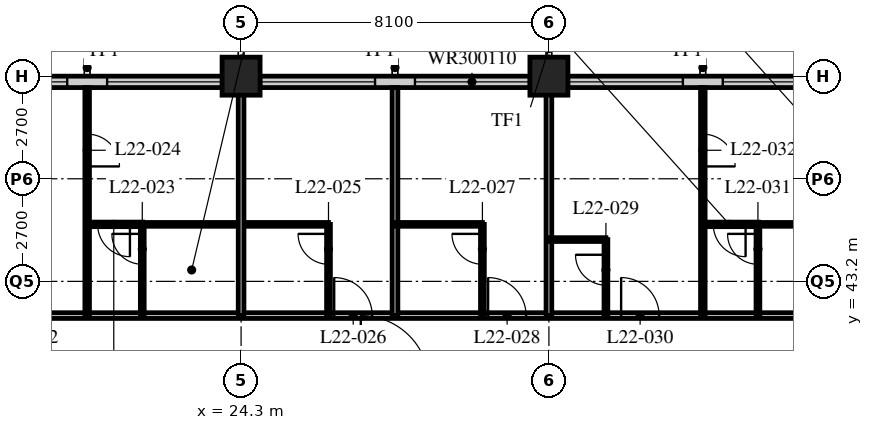
"""IFC4 building model, lengths in metres.
Left out: names, types, materials, properties, quantities, classifications, styles, units other than length and angle.
Written with IfcOpenShell. Run it as: python <this file> out.ifc"""

import sys

from ifc_helpers import new_model, si_unit, direction, frame, frame_2d, origin, origin_2d, place, context, subcontext, project, spatial, rectangle, hollow_rectangle, extrude, element, fill, save


model = new_model("IFC4")
c1 = context("Model", 3, precision=1e-05, world=origin(), true_north=direction((0.0, 1.0)))
c2 = subcontext(c1, "Body", "Model", "MODEL_VIEW")
j1 = project(units=[si_unit("LENGTHUNIT", "METRE"), si_unit("PLANEANGLEUNIT", "RADIAN")], contexts=[c1])
p1 = place(None, origin())
s1 = spatial("IfcSite", under=j1, at=p1, CompositionType="ELEMENT")
p2 = place(p1, origin())
s2 = spatial("IfcBuilding", under=s1, at=p2, CompositionType="ELEMENT")
p3 = place(p2, frame((0.0, 0.0, 87.4)))
s3 = spatial("IfcBuildingStorey", under=s2, at=p3, CompositionType="ELEMENT", Elevation=87.4)
for number, where, z_axis, x_axis in (
    (1, (24.3, 48.6, 0.0), (0.0, 0.0, 1.0), (1.0, 0.0, 0.0)),
    (2, (32.4, 48.6, 0.0), (0.0, 0.0, 1.0), (1.0, 0.0, 0.0)),
):
    element("IfcColumn", number, at=place(p3, frame(where, z_axis=z_axis, x_axis=x_axis)), inside=s3, PredefinedType="COLUMN", context=c2, shape_type="SweptSolid", body=[
        extrude(hollow_rectangle(XDim=1.0, YDim=1.0, WallThickness=0.1, at=origin_2d()), origin(), (0.0, 0.0, 1.0), 3.4),
    ])
p4 = place(p3, frame((48.3, 48.45, 0.0), z_axis=(0.0, 0.0, 1.0), x_axis=(-1.0, 0.0, 0.0)))
e3 = element("IfcWall", 3, at=p4, inside=s3, PredefinedType="SOLIDWALL", context=c2, shape_type="SweptSolid", body=[
    extrude(rectangle(XDim=40.2, YDim=0.3, at=frame_2d((20.1, 0.0))), origin(), (0.0, 0.0, 1.0), 2.05),
])
p5 = place(p4, frame((0.225, 0.0, 0.9)))
e4 = element("IfcOpeningElement", 4, at=p5, cuts=e3, PredefinedType="OPENING", context=c2, shape_type="SweptSolid", body=[
    extrude(rectangle(XDim=3.0, YDim=1.1, at=frame_2d((1.5, 0.55))), frame((0.0, 0.16, 0.0), z_axis=(0.0, -1.0, 0.0), x_axis=(1.0, 0.0, 0.0)), (0.0, 0.0, 1.0), 0.32),
])
p6 = place(p4, frame((4.275, 0.0, 0.9)))
e5 = element("IfcOpeningElement", 5, at=p6, cuts=e3, PredefinedType="OPENING", context=c2, shape_type="SweptSolid", body=[
    extrude(rectangle(XDim=3.0, YDim=1.1, at=frame_2d((1.5, 0.55))), frame((0.0, 0.16, 0.0), z_axis=(0.0, -1.0, 0.0), x_axis=(1.0, 0.0, 0.0)), (0.0, 0.0, 1.0), 0.32),
])
p7 = place(p4, frame((8.325, 0.0, 0.9)))
e6 = element("IfcOpeningElement", 6, at=p7, cuts=e3, PredefinedType="OPENING", context=c2, shape_type="SweptSolid", body=[
    extrude(rectangle(XDim=3.0, YDim=1.1, at=frame_2d((1.5, 0.55))), frame((0.0, 0.16, 0.0), z_axis=(0.0, -1.0, 0.0), x_axis=(1.0, 0.0, 0.0)), (0.0, 0.0, 1.0), 0.32),
])
p8 = place(p4, frame((12.375, 0.0, 0.9)))
e7 = element("IfcOpeningElement", 7, at=p8, cuts=e3, PredefinedType="OPENING", context=c2, shape_type="SweptSolid", body=[
    extrude(rectangle(XDim=3.0, YDim=1.1, at=frame_2d((1.5, 0.55))), frame((0.0, 0.16, 0.0), z_axis=(0.0, -1.0, 0.0), x_axis=(1.0, 0.0, 0.0)), (0.0, 0.0, 1.0), 0.32),
])
p9 = place(p4, frame((16.425, 0.0, 0.9)))
e8 = element("IfcOpeningElement", 8, at=p9, cuts=e3, PredefinedType="OPENING", context=c2, shape_type="SweptSolid", body=[
    extrude(rectangle(XDim=3.0, YDim=1.1, at=frame_2d((1.5, 0.55))), frame((0.0, 0.16, 0.0), z_axis=(0.0, -1.0, 0.0), x_axis=(1.0, 0.0, 0.0)), (0.0, 0.0, 1.0), 0.32),
])
p10 = place(p4, frame((20.475, 0.0, 0.9)))
e9 = element("IfcOpeningElement", 9, at=p10, cuts=e3, PredefinedType="OPENING", context=c2, shape_type="SweptSolid", body=[
    extrude(rectangle(XDim=3.0, YDim=1.1, at=frame_2d((1.5, 0.55))), frame((0.0, 0.16, 0.0), z_axis=(0.0, -1.0, 0.0), x_axis=(1.0, 0.0, 0.0)), (0.0, 0.0, 1.0), 0.32),
])
p11 = place(p4, frame((24.525, 0.0, 0.9)))
e10 = element("IfcOpeningElement", 10, at=p11, cuts=e3, PredefinedType="OPENING", context=c2, shape_type="SweptSolid", body=[
    extrude(rectangle(XDim=3.0, YDim=1.1, at=frame_2d((1.5, 0.55))), frame((0.0, 0.16, 0.0), z_axis=(0.0, -1.0, 0.0), x_axis=(1.0, 0.0, 0.0)), (0.0, 0.0, 1.0), 0.32),
])
p12 = place(p4, frame((28.575, 0.0, 0.9)))
e11 = element("IfcOpeningElement", 11, at=p12, cuts=e3, PredefinedType="OPENING", context=c2, shape_type="SweptSolid", body=[
    extrude(rectangle(XDim=3.0, YDim=1.1, at=frame_2d((1.5, 0.55))), frame((0.0, 0.16, 0.0), z_axis=(0.0, -1.0, 0.0), x_axis=(1.0, 0.0, 0.0)), (0.0, 0.0, 1.0), 0.32),
])
p13 = place(p4, frame((32.625, 0.0, 0.9)))
e12 = element("IfcOpeningElement", 12, at=p13, cuts=e3, PredefinedType="OPENING", context=c2, shape_type="SweptSolid", body=[
    extrude(rectangle(XDim=3.0, YDim=1.1, at=frame_2d((1.5, 0.55))), frame((0.0, 0.16, 0.0), z_axis=(0.0, -1.0, 0.0), x_axis=(1.0, 0.0, 0.0)), (0.0, 0.0, 1.0), 0.32),
])
p14 = place(p4, frame((36.675, 0.0, 0.9)))
e13 = element("IfcOpeningElement", 13, at=p14, cuts=e3, PredefinedType="OPENING", context=c2, shape_type="SweptSolid", body=[
    extrude(rectangle(XDim=3.0, YDim=1.1, at=frame_2d((1.5, 0.55))), frame((0.0, 0.16, 0.0), z_axis=(0.0, -1.0, 0.0), x_axis=(1.0, 0.0, 0.0)), (0.0, 0.0, 1.0), 0.32),
])
p15 = place(p3, frame((12.15, 42.3, 0.0), z_axis=(0.0, 0.0, 1.0), x_axis=(1.0, 0.0, 0.0)))
e14 = element("IfcWall", 14, at=p15, inside=s3, PredefinedType="PARTITIONING", context=c2, shape_type="SweptSolid", body=[
    extrude(rectangle(XDim=32.4, YDim=0.15, at=frame_2d((16.2, 0.0))), origin(), (0.0, 0.0, 1.0), 3.15),
])
p16 = place(p15, frame((5.95, 0.0, 0.0)))
e15 = element("IfcOpeningElement", 15, at=p16, cuts=e14, PredefinedType="OPENING", context=c2, shape_type="SweptSolid", body=[
    extrude(rectangle(XDim=1.0, YDim=2.1, at=frame_2d((0.5, 1.05))), frame((0.0, 0.085, 0.0), z_axis=(0.0, -1.0, 0.0), x_axis=(1.0, 0.0, 0.0)), (0.0, 0.0, 1.0), 0.17),
])
p17 = place(p15, frame((14.6, 0.0, 0.0)))
e16 = element("IfcOpeningElement", 16, at=p17, cuts=e14, PredefinedType="OPENING", context=c2, shape_type="SweptSolid", body=[
    extrude(rectangle(XDim=1.0, YDim=2.1, at=frame_2d((0.5, 1.05))), frame((0.0, 0.085, 0.0), z_axis=(0.0, -1.0, 0.0), x_axis=(1.0, 0.0, 0.0)), (0.0, 0.0, 1.0), 0.17),
])
p18 = place(p15, frame((18.65, 0.0, 0.0)))
e17 = element("IfcOpeningElement", 17, at=p18, cuts=e14, PredefinedType="OPENING", context=c2, shape_type="SweptSolid", body=[
    extrude(rectangle(XDim=1.0, YDim=2.1, at=frame_2d((0.5, 1.05))), frame((0.0, 0.085, 0.0), z_axis=(0.0, -1.0, 0.0), x_axis=(1.0, 0.0, 0.0)), (0.0, 0.0, 1.0), 0.17),
])
p19 = place(p15, frame((22.15, 0.0, 0.0)))
e18 = element("IfcOpeningElement", 18, at=p19, cuts=e14, PredefinedType="OPENING", context=c2, shape_type="SweptSolid", body=[
    extrude(rectangle(XDim=1.0, YDim=2.1, at=frame_2d((0.5, 1.05))), frame((0.0, 0.085, 0.0), z_axis=(0.0, -1.0, 0.0), x_axis=(1.0, 0.0, 0.0)), (0.0, 0.0, 1.0), 0.17),
])
p20 = place(p15, frame((29.025, 0.0, 0.0)))
e19 = element("IfcOpeningElement", 19, at=p20, cuts=e14, PredefinedType="OPENING", context=c2, shape_type="SweptSolid", body=[
    extrude(rectangle(XDim=1.0, YDim=2.1, at=frame_2d((0.5, 1.05))), frame((0.0, 0.085, 0.0), z_axis=(0.0, -1.0, 0.0), x_axis=(1.0, 0.0, 0.0)), (0.0, 0.0, 1.0), 0.17),
])
p21 = place(p15, frame((2.375, 0.0, 0.0)))
e20 = element("IfcOpeningElement", 20, at=p21, cuts=e14, PredefinedType="OPENING", context=c2, shape_type="SweptSolid", body=[
    extrude(rectangle(XDim=1.0, YDim=2.1, at=frame_2d((0.5, 1.05))), frame((0.0, 0.085, 0.0), z_axis=(0.0, -1.0, 0.0), x_axis=(1.0, 0.0, 0.0)), (0.0, 0.0, 1.0), 0.17),
])
p22 = place(p3, frame((21.7, 44.7, 0.0), z_axis=(0.0, 0.0, 1.0), x_axis=(1.0, 0.0, 0.0)))
e21 = element("IfcWall", 21, at=p22, inside=s3, PredefinedType="PARTITIONING", context=c2, shape_type="SweptSolid", body=[
    extrude(rectangle(XDim=4.9, YDim=0.1, at=frame_2d((2.45, 0.0))), origin(), (0.0, 0.0, 1.0), 3.15),
])
p23 = place(p3, frame((21.7, 42.3, 0.0), z_axis=(0.0, 0.0, 1.0), x_axis=(0.0, 1.0, 0.0)))
e22 = element("IfcWall", 22, at=p23, inside=s3, PredefinedType="PARTITIONING", context=c2, shape_type="SweptSolid", body=[
    extrude(rectangle(XDim=2.4, YDim=0.1, at=frame_2d((1.2, 0.0))), origin(), (0.0, 0.0, 1.0), 3.15),
])
p24 = place(p23, frame((1.35, 0.0, 0.0)))
e23 = element("IfcOpeningElement", 23, at=p24, cuts=e22, PredefinedType="OPENING", context=c2, shape_type="SweptSolid", body=[
    extrude(rectangle(XDim=0.8, YDim=2.1, at=frame_2d((0.4, 1.05))), frame((0.0, 0.06, 0.0), z_axis=(0.0, -1.0, 0.0), x_axis=(1.0, 0.0, 0.0)), (0.0, 0.0, 1.0), 0.12),
])
p25 = place(p3, frame((20.25, 42.3, 0.0), z_axis=(0.0, 0.0, 1.0), x_axis=(0.0, 1.0, 0.0)))
e24 = element("IfcWall", 24, at=p25, inside=s3, PredefinedType="PARTITIONING", context=c2, shape_type="SweptSolid", body=[
    extrude(rectangle(XDim=6.0, YDim=0.12, at=frame_2d((3.0, 0.0))), origin(), (0.0, 0.0, 1.0), 3.15),
])
p26 = place(p25, frame((3.925, 0.0, 0.0)))
e25 = element("IfcOpeningElement", 25, at=p26, cuts=e24, PredefinedType="OPENING", context=c2, shape_type="SweptSolid", body=[
    extrude(rectangle(XDim=0.85, YDim=2.1, at=frame_2d((0.425, 1.05))), frame((0.0, 0.07, 0.0), z_axis=(0.0, -1.0, 0.0), x_axis=(1.0, 0.0, 0.0)), (0.0, 0.0, 1.0), 0.14),
])
p27 = place(p3, frame((24.3, 42.3, 0.0), z_axis=(0.0, 0.0, 1.0), x_axis=(0.0, 1.0, 0.0)))
e26 = element("IfcWall", 26, at=p27, inside=s3, PredefinedType="PARTITIONING", context=c2, shape_type="SweptSolid", body=[
    extrude(rectangle(XDim=6.0, YDim=0.15, at=frame_2d((3.0, 0.0))), origin(), (0.0, 0.0, 1.0), 2.05),
])
p28 = place(p3, frame((26.6, 42.3, 0.0), z_axis=(0.0, 0.0, 1.0), x_axis=(0.0, 1.0, 0.0)))
e27 = element("IfcWall", 27, at=p28, inside=s3, PredefinedType="PARTITIONING", context=c2, shape_type="SweptSolid", body=[
    extrude(rectangle(XDim=2.4, YDim=0.1, at=frame_2d((1.2, 0.0))), origin(), (0.0, 0.0, 1.0), 3.15),
])
p29 = place(p28, frame((1.35, 0.0, 0.0)))
e28 = element("IfcOpeningElement", 28, at=p29, cuts=e27, PredefinedType="OPENING", context=c2, shape_type="SweptSolid", body=[
    extrude(rectangle(XDim=0.8, YDim=2.1, at=frame_2d((0.4, 1.05))), frame((0.0, 0.06, 0.0), z_axis=(0.0, -1.0, 0.0), x_axis=(1.0, 0.0, 0.0)), (0.0, 0.0, 1.0), 0.12),
])
p30 = place(p3, frame((28.35, 42.3, 0.0), z_axis=(0.0, 0.0, 1.0), x_axis=(0.0, 1.0, 0.0)))
e29 = element("IfcWall", 29, at=p30, inside=s3, PredefinedType="PARTITIONING", context=c2, shape_type="SweptSolid", body=[
    extrude(rectangle(XDim=6.0, YDim=0.15, at=frame_2d((3.0, 0.0))), origin(), (0.0, 0.0, 1.0), 3.15),
])
p31 = place(p3, frame((28.35, 44.7, 0.0), z_axis=(0.0, 0.0, 1.0), x_axis=(1.0, 0.0, 0.0)))
e30 = element("IfcWall", 30, at=p31, inside=s3, PredefinedType="PARTITIONING", context=c2, shape_type="SweptSolid", body=[
    extrude(rectangle(XDim=2.3, YDim=0.1, at=frame_2d((1.15, 0.0))), origin(), (0.0, 0.0, 1.0), 3.15),
])
p32 = place(p3, frame((30.65, 42.3, 0.0), z_axis=(0.0, 0.0, 1.0), x_axis=(0.0, 1.0, 0.0)))
e31 = element("IfcWall", 31, at=p32, inside=s3, PredefinedType="PARTITIONING", context=c2, shape_type="SweptSolid", body=[
    extrude(rectangle(XDim=2.4, YDim=0.1, at=frame_2d((1.2, 0.0))), origin(), (0.0, 0.0, 1.0), 3.15),
])
p33 = place(p32, frame((1.35, 0.0, 0.0)))
e32 = element("IfcOpeningElement", 32, at=p33, cuts=e31, PredefinedType="OPENING", context=c2, shape_type="SweptSolid", body=[
    extrude(rectangle(XDim=0.8, YDim=2.1, at=frame_2d((0.4, 1.05))), frame((0.0, 0.06, 0.0), z_axis=(0.0, -1.0, 0.0), x_axis=(1.0, 0.0, 0.0)), (0.0, 0.0, 1.0), 0.12),
])
p34 = place(p3, frame((32.4, 42.3, 0.0), z_axis=(0.0, 0.0, 1.0), x_axis=(0.0, 1.0, 0.0)))
e33 = element("IfcWall", 33, at=p34, inside=s3, PredefinedType="PARTITIONING", context=c2, shape_type="SweptSolid", body=[
    extrude(rectangle(XDim=6.0, YDim=0.15, at=frame_2d((3.0, 0.0))), origin(), (0.0, 0.0, 1.0), 2.05),
])
p35 = place(p3, frame((32.4, 44.3, 0.0), z_axis=(0.0, 0.0, 1.0), x_axis=(1.0, 0.0, 0.0)))
e34 = element("IfcWall", 34, at=p35, inside=s3, PredefinedType="PARTITIONING", context=c2, shape_type="SweptSolid", body=[
    extrude(rectangle(XDim=1.5, YDim=0.1, at=frame_2d((0.75, 0.0))), origin(), (0.0, 0.0, 1.0), 3.15),
])
p36 = place(p3, frame((33.9, 42.3, 0.0), z_axis=(0.0, 0.0, 1.0), x_axis=(0.0, 1.0, 0.0)))
e35 = element("IfcWall", 35, at=p36, inside=s3, PredefinedType="PARTITIONING", context=c2, shape_type="SweptSolid", body=[
    extrude(rectangle(XDim=2.0, YDim=0.1, at=frame_2d((1.0, 0.0))), origin(), (0.0, 0.0, 1.0), 3.15),
])
p37 = place(p36, frame((0.8, 0.0, 0.0)))
e36 = element("IfcOpeningElement", 36, at=p37, cuts=e35, PredefinedType="OPENING", context=c2, shape_type="SweptSolid", body=[
    extrude(rectangle(XDim=0.8, YDim=2.1, at=frame_2d((0.4, 1.05))), frame((0.0, 0.06, 0.0), z_axis=(0.0, -1.0, 0.0), x_axis=(1.0, 0.0, 0.0)), (0.0, 0.0, 1.0), 0.12),
])
p38 = place(p3, frame((37.9, 44.7, 0.0), z_axis=(0.0, 0.0, 1.0), x_axis=(1.0, 0.0, 0.0)))
e37 = element("IfcWall", 37, at=p38, inside=s3, PredefinedType="PARTITIONING", context=c2, shape_type="SweptSolid", body=[
    extrude(rectangle(XDim=2.6, YDim=0.1, at=frame_2d((1.3, 0.0))), origin(), (0.0, 0.0, 1.0), 3.15),
])
p39 = place(p3, frame((37.9, 42.3, 0.0), z_axis=(0.0, 0.0, 1.0), x_axis=(0.0, 1.0, 0.0)))
e38 = element("IfcWall", 38, at=p39, inside=s3, PredefinedType="PARTITIONING", context=c2, shape_type="SweptSolid", body=[
    extrude(rectangle(XDim=2.4, YDim=0.1, at=frame_2d((1.2, 0.0))), origin(), (0.0, 0.0, 1.0), 3.15),
])
p40 = place(p39, frame((1.35, 0.0, 0.0)))
e39 = element("IfcOpeningElement", 39, at=p40, cuts=e38, PredefinedType="OPENING", context=c2, shape_type="SweptSolid", body=[
    extrude(rectangle(XDim=0.8, YDim=2.1, at=frame_2d((0.4, 1.05))), frame((0.0, 0.06, 0.0), z_axis=(0.0, -1.0, 0.0), x_axis=(1.0, 0.0, 0.0)), (0.0, 0.0, 1.0), 0.12),
])
p41 = place(p3, frame((36.45, 42.3, 0.0), z_axis=(0.0, 0.0, 1.0), x_axis=(0.0, 1.0, 0.0)))
e40 = element("IfcWall", 40, at=p41, inside=s3, PredefinedType="PARTITIONING", context=c2, shape_type="SweptSolid", body=[
    extrude(rectangle(XDim=6.0, YDim=0.12, at=frame_2d((3.0, 0.0))), origin(), (0.0, 0.0, 1.0), 3.15),
])
p42 = place(p41, frame((3.925, 0.0, 0.0)))
e41 = element("IfcOpeningElement", 41, at=p42, cuts=e40, PredefinedType="OPENING", context=c2, shape_type="SweptSolid", body=[
    extrude(rectangle(XDim=0.85, YDim=2.1, at=frame_2d((0.425, 1.05))), frame((0.0, 0.07, 0.0), z_axis=(0.0, -1.0, 0.0), x_axis=(1.0, 0.0, 0.0)), (0.0, 0.0, 1.0), 0.14),
])
p43 = place(p3, frame((20.25, 44.7, 0.0), z_axis=(0.0, 0.0, 1.0), x_axis=(1.0, 0.0, 0.0)))
e42 = element("IfcWall", 42, at=p43, inside=s3, PredefinedType="PARTITIONING", context=c2, shape_type="SweptSolid", body=[
    extrude(rectangle(XDim=1.46, YDim=0.12, at=frame_2d((0.73, 0.0))), origin(), (0.0, 0.0, 1.0), 3.15),
])
p44 = place(p43, frame((0.275, 0.0, 0.0)))
e43 = element("IfcOpeningElement", 43, at=p44, cuts=e42, PredefinedType="OPENING", context=c2, shape_type="SweptSolid", body=[
    extrude(rectangle(XDim=0.85, YDim=2.1, at=frame_2d((0.425, 1.05))), frame((0.0, 0.07, 0.0), z_axis=(0.0, -1.0, 0.0), x_axis=(1.0, 0.0, 0.0)), (0.0, 0.0, 1.0), 0.14),
])
p45 = place(p3, frame((36.45, 44.7, 0.0), z_axis=(0.0, 0.0, 1.0), x_axis=(1.0, 0.0, 0.0)))
e44 = element("IfcWall", 44, at=p45, inside=s3, PredefinedType="PARTITIONING", context=c2, shape_type="SweptSolid", body=[
    extrude(rectangle(XDim=1.46, YDim=0.12, at=frame_2d((0.73, 0.0))), origin(), (0.0, 0.0, 1.0), 3.15),
])
p46 = place(p45, frame((0.275, 0.0, 0.0)))
e45 = element("IfcOpeningElement", 45, at=p46, cuts=e44, PredefinedType="OPENING", context=c2, shape_type="SweptSolid", body=[
    extrude(rectangle(XDim=0.85, YDim=2.1, at=frame_2d((0.425, 1.05))), frame((0.0, 0.07, 0.0), z_axis=(0.0, -1.0, 0.0), x_axis=(1.0, 0.0, 0.0)), (0.0, 0.0, 1.0), 0.14),
])
p47 = place(p7, origin())
e46 = element("IfcWindow", 46, at=p47, inside=s3, PartitioningType="SINGLE_PANEL", PredefinedType="WINDOW", context=c2, shape_type="SweptSolid", body=[
    extrude(rectangle(XDim=3.0, YDim=1.1, at=frame_2d((1.5, 0.55))), frame((0.0, 0.03, 0.0), z_axis=(0.0, -1.0, 0.0), x_axis=(1.0, 0.0, 0.0)), (0.0, 0.0, 1.0), 0.06),
])
fill(e6, e46)
p48 = place(p8, origin())
e47 = element("IfcWindow", 47, at=p48, inside=s3, PartitioningType="SINGLE_PANEL", PredefinedType="WINDOW", context=c2, shape_type="SweptSolid", body=[
    extrude(rectangle(XDim=3.0, YDim=1.1, at=frame_2d((1.5, 0.55))), frame((0.0, 0.03, 0.0), z_axis=(0.0, -1.0, 0.0), x_axis=(1.0, 0.0, 0.0)), (0.0, 0.0, 1.0), 0.06),
])
fill(e7, e47)
p49 = place(p9, origin())
e48 = element("IfcWindow", 48, at=p49, inside=s3, PartitioningType="SINGLE_PANEL", PredefinedType="WINDOW", context=c2, shape_type="SweptSolid", body=[
    extrude(rectangle(XDim=3.0, YDim=1.1, at=frame_2d((1.5, 0.55))), frame((0.0, 0.03, 0.0), z_axis=(0.0, -1.0, 0.0), x_axis=(1.0, 0.0, 0.0)), (0.0, 0.0, 1.0), 0.06),
])
fill(e8, e48)
p50 = place(p10, origin())
e49 = element("IfcWindow", 49, at=p50, inside=s3, PartitioningType="SINGLE_PANEL", PredefinedType="WINDOW", context=c2, shape_type="SweptSolid", body=[
    extrude(rectangle(XDim=3.0, YDim=1.1, at=frame_2d((1.5, 0.55))), frame((0.0, 0.03, 0.0), z_axis=(0.0, -1.0, 0.0), x_axis=(1.0, 0.0, 0.0)), (0.0, 0.0, 1.0), 0.06),
])
fill(e9, e49)
p51 = place(p11, origin())
e50 = element("IfcWindow", 50, at=p51, inside=s3, PartitioningType="SINGLE_PANEL", PredefinedType="WINDOW", context=c2, shape_type="SweptSolid", body=[
    extrude(rectangle(XDim=3.0, YDim=1.1, at=frame_2d((1.5, 0.55))), frame((0.0, 0.03, 0.0), z_axis=(0.0, -1.0, 0.0), x_axis=(1.0, 0.0, 0.0)), (0.0, 0.0, 1.0), 0.06),
])
fill(e10, e50)
p52 = place(p12, origin())
e51 = element("IfcWindow", 51, at=p52, inside=s3, PartitioningType="SINGLE_PANEL", PredefinedType="WINDOW", context=c2, shape_type="SweptSolid", body=[
    extrude(rectangle(XDim=3.0, YDim=1.1, at=frame_2d((1.5, 0.55))), frame((0.0, 0.03, 0.0), z_axis=(0.0, -1.0, 0.0), x_axis=(1.0, 0.0, 0.0)), (0.0, 0.0, 1.0), 0.06),
])
fill(e11, e51)
p53 = place(p24, origin())
e52 = element("IfcDoor", 52, at=p53, inside=s3, OperationType="SINGLE_SWING_RIGHT", PredefinedType="DOOR", context=c2, shape_type="SweptSolid", body=[
    extrude(rectangle(XDim=0.8, YDim=2.1, at=frame_2d((0.4, 1.05))), frame((0.0, 0.025, 0.0), z_axis=(0.0, -1.0, 0.0), x_axis=(1.0, 0.0, 0.0)), (0.0, 0.0, 1.0), 0.05),
])
fill(e23, e52)
p54 = place(p26, origin())
e53 = element("IfcDoor", 53, at=p54, inside=s3, OperationType="SINGLE_SWING_RIGHT", PredefinedType="DOOR", context=c2, shape_type="SweptSolid", body=[
    extrude(rectangle(XDim=0.85, YDim=2.1, at=frame_2d((0.425, 1.05))), frame((0.0, 0.025, 0.0), z_axis=(0.0, -1.0, 0.0), x_axis=(1.0, 0.0, 0.0)), (0.0, 0.0, 1.0), 0.05),
])
fill(e25, e53)
p55 = place(p29, origin())
e54 = element("IfcDoor", 54, at=p55, inside=s3, OperationType="SINGLE_SWING_RIGHT", PredefinedType="DOOR", context=c2, shape_type="SweptSolid", body=[
    extrude(rectangle(XDim=0.8, YDim=2.1, at=frame_2d((0.4, 1.05))), frame((0.0, 0.025, 0.0), z_axis=(0.0, -1.0, 0.0), x_axis=(1.0, 0.0, 0.0)), (0.0, 0.0, 1.0), 0.05),
])
fill(e28, e54)
p56 = place(p17, origin())
e55 = element("IfcDoor", 55, at=p56, inside=s3, OperationType="SINGLE_SWING_LEFT", PredefinedType="DOOR", context=c2, shape_type="SweptSolid", body=[
    extrude(rectangle(XDim=1.0, YDim=2.1, at=frame_2d((0.5, 1.05))), frame((0.0, 0.025, 0.0), z_axis=(0.0, -1.0, 0.0), x_axis=(1.0, 0.0, 0.0)), (0.0, 0.0, 1.0), 0.05),
])
fill(e16, e55)
p57 = place(p33, origin())
e56 = element("IfcDoor", 56, at=p57, inside=s3, OperationType="SINGLE_SWING_RIGHT", PredefinedType="DOOR", context=c2, shape_type="SweptSolid", body=[
    extrude(rectangle(XDim=0.8, YDim=2.1, at=frame_2d((0.4, 1.05))), frame((0.0, 0.025, 0.0), z_axis=(0.0, -1.0, 0.0), x_axis=(1.0, 0.0, 0.0)), (0.0, 0.0, 1.0), 0.05),
])
fill(e32, e56)
p58 = place(p18, origin())
e57 = element("IfcDoor", 57, at=p58, inside=s3, OperationType="SINGLE_SWING_LEFT", PredefinedType="DOOR", context=c2, shape_type="SweptSolid", body=[
    extrude(rectangle(XDim=1.0, YDim=2.1, at=frame_2d((0.5, 1.05))), frame((0.0, 0.025, 0.0), z_axis=(0.0, -1.0, 0.0), x_axis=(1.0, 0.0, 0.0)), (0.0, 0.0, 1.0), 0.05),
])
fill(e17, e57)
p59 = place(p37, origin())
e58 = element("IfcDoor", 58, at=p59, inside=s3, OperationType="SINGLE_SWING_RIGHT", PredefinedType="DOOR", context=c2, shape_type="SweptSolid", body=[
    extrude(rectangle(XDim=0.8, YDim=2.1, at=frame_2d((0.4, 1.05))), frame((0.0, 0.025, 0.0), z_axis=(0.0, -1.0, 0.0), x_axis=(1.0, 0.0, 0.0)), (0.0, 0.0, 1.0), 0.05),
])
fill(e36, e58)
p60 = place(p19, origin())
e59 = element("IfcDoor", 59, at=p60, inside=s3, OperationType="SINGLE_SWING_LEFT", PredefinedType="DOOR", context=c2, shape_type="SweptSolid", body=[
    extrude(rectangle(XDim=1.0, YDim=2.1, at=frame_2d((0.5, 1.05))), frame((0.0, 0.025, 0.0), z_axis=(0.0, -1.0, 0.0), x_axis=(1.0, 0.0, 0.0)), (0.0, 0.0, 1.0), 0.05),
])
fill(e18, e59)
p61 = place(p40, origin())
e60 = element("IfcDoor", 60, at=p61, inside=s3, OperationType="SINGLE_SWING_RIGHT", PredefinedType="DOOR", context=c2, shape_type="SweptSolid", body=[
    extrude(rectangle(XDim=0.8, YDim=2.1, at=frame_2d((0.4, 1.05))), frame((0.0, 0.025, 0.0), z_axis=(0.0, -1.0, 0.0), x_axis=(1.0, 0.0, 0.0)), (0.0, 0.0, 1.0), 0.05),
])
fill(e39, e60)
p62 = place(p42, origin())
e61 = element("IfcDoor", 61, at=p62, inside=s3, OperationType="SINGLE_SWING_RIGHT", PredefinedType="DOOR", context=c2, shape_type="SweptSolid", body=[
    extrude(rectangle(XDim=0.85, YDim=2.1, at=frame_2d((0.425, 1.05))), frame((0.0, 0.025, 0.0), z_axis=(0.0, -1.0, 0.0), x_axis=(1.0, 0.0, 0.0)), (0.0, 0.0, 1.0), 0.05),
])
fill(e41, e61)
p63 = place(p44, origin())
e62 = element("IfcDoor", 62, at=p63, inside=s3, OperationType="SINGLE_SWING_LEFT", PredefinedType="DOOR", context=c2, shape_type="SweptSolid", body=[
    extrude(rectangle(XDim=0.85, YDim=2.1, at=frame_2d((0.425, 1.05))), frame((0.0, 0.025, 0.0), z_axis=(0.0, -1.0, 0.0), x_axis=(1.0, 0.0, 0.0)), (0.0, 0.0, 1.0), 0.05),
])
fill(e43, e62)
p64 = place(p46, origin())
e63 = element("IfcDoor", 63, at=p64, inside=s3, OperationType="SINGLE_SWING_LEFT", PredefinedType="DOOR", context=c2, shape_type="SweptSolid", body=[
    extrude(rectangle(XDim=0.85, YDim=2.1, at=frame_2d((0.425, 1.05))), frame((0.0, 0.025, 0.0), z_axis=(0.0, -1.0, 0.0), x_axis=(1.0, 0.0, 0.0)), (0.0, 0.0, 1.0), 0.05),
])
fill(e45, e63)
save(model, sys.argv[1])
